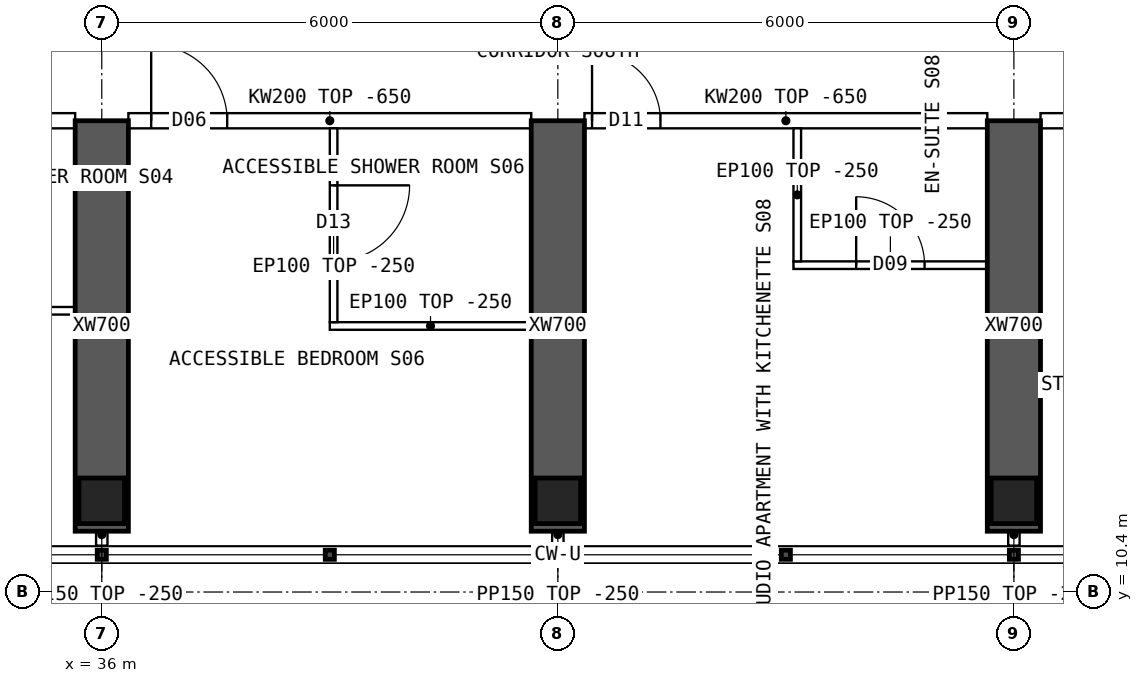
"""IFC4 building model, lengths in metres.
Left out: names, types, materials, properties, quantities, classifications, styles, units other than length and angle.
Written with IfcOpenShell. Run it as: python <this file> out.ifc"""

import sys

from ifc_helpers import new_model, si_unit, direction, frame, frame_2d, origin, origin_2d, place, context, subcontext, project, spatial, polyline, rectangle, hollow_rectangle, outline, extrude, element, fill, save


model = new_model("IFC4")
c1 = context("Model", 3, precision=1e-05, world=origin(), true_north=direction((0.0, 1.0)))
c2 = subcontext(c1, "Body", "Model", "MODEL_VIEW")
j1 = project(units=[si_unit("LENGTHUNIT", "METRE"), si_unit("PLANEANGLEUNIT", "RADIAN")], contexts=[c1])
p1 = place(None, origin())
s1 = spatial("IfcSite", under=j1, at=p1, CompositionType="ELEMENT")
p2 = place(p1, origin())
s2 = spatial("IfcBuilding", under=s1, at=p2, CompositionType="ELEMENT")
p3 = place(p2, frame((0.0, 0.0, 246.55)))
s3 = spatial("IfcBuildingStorey", under=s2, at=p3, CompositionType="ELEMENT", Elevation=246.55)
for number, where, z_axis, x_axis in (
    (1, (36.0, 11.6, 0.0), (0.0, 0.0, 1.0), (1.0, 0.0, 0.0)),
    (2, (42.0, 11.6, 0.0), (0.0, 0.0, 1.0), (1.0, 0.0, 0.0)),
    (3, (48.0, 11.6, 0.0), (0.0, 0.0, 1.0), (1.0, 0.0, 0.0)),
):
    element("IfcColumn", number, at=place(p3, frame(where, z_axis=z_axis, x_axis=x_axis)), inside=s3, PredefinedType="COLUMN", context=c2, shape_type="SweptSolid", body=[
        extrude(hollow_rectangle(XDim=0.6, YDim=0.6, WallThickness=0.06, at=origin_2d()), origin(), (0.0, 0.0, 1.0), 3.75),
    ])
for number, where, z_axis, x_axis in (
    (4, (36.0, 11.2, 0.0), (0.0, 0.0, 1.0), (0.0, 1.0, 0.0)),
    (5, (42.0, 11.2, 0.0), (0.0, 0.0, 1.0), (0.0, 1.0, 0.0)),
    (6, (48.0, 11.2, 0.0), (0.0, 0.0, 1.0), (0.0, 1.0, 0.0)),
):
    element("IfcWall", number, at=place(p3, frame(where, z_axis=z_axis, x_axis=x_axis)), inside=s3, PredefinedType="SHEAR", context=c2, shape_type="SweptSolid", body=[
        extrude(rectangle(XDim=5.4, YDim=0.7, at=frame_2d((2.7, 0.0))), origin(), (0.0, 0.0, 1.0), 3.75),
    ])
p4 = place(p3, frame((30.35, 16.6, 0.0), z_axis=(0.0, 0.0, 1.0), x_axis=(1.0, 0.0, 0.0)))
e7 = element("IfcWall", 7, at=p4, inside=s3, PredefinedType="SOLIDWALL", context=c2, shape_type="SweptSolid", body=[
    extrude(outline(polyline([(0.0, 0.0), (5.3, 0.0), (5.3, 3.1), (0.0, 3.1), (0.0, 0.0)])), frame((0.0, 0.1, 0.0), z_axis=(0.0, -1.0, 0.0), x_axis=(1.0, 0.0, 0.0)), (0.0, 0.0, 1.0), 0.2),
])
p5 = place(p4, frame((2.3, 0.0, 0.0)))
e8 = element("IfcOpeningElement", 8, at=p5, cuts=e7, PredefinedType="OPENING", context=c2, shape_type="SweptSolid", body=[
    extrude(rectangle(XDim=0.9, YDim=2.1, at=frame_2d((0.45, 1.05))), frame((0.0, 0.11, 0.0), z_axis=(0.0, -1.0, 0.0), x_axis=(1.0, 0.0, 0.0)), (0.0, 0.0, 1.0), 0.22),
])
p6 = place(p3, frame((36.35, 16.6, 0.0), z_axis=(0.0, 0.0, 1.0), x_axis=(1.0, 0.0, 0.0)))
e9 = element("IfcWall", 9, at=p6, inside=s3, PredefinedType="SOLIDWALL", context=c2, shape_type="SweptSolid", body=[
    extrude(outline(polyline([(0.0, 0.0), (5.3, 0.0), (5.3, 3.1), (0.0, 3.1), (0.0, 0.0)])), frame((0.0, 0.1, 0.0), z_axis=(0.0, -1.0, 0.0), x_axis=(1.0, 0.0, 0.0)), (0.0, 0.0, 1.0), 0.2),
])
p7 = place(p6, frame((0.3, 0.0, 0.0)))
e10 = element("IfcOpeningElement", 10, at=p7, cuts=e9, PredefinedType="OPENING", context=c2, shape_type="SweptSolid", body=[
    extrude(rectangle(XDim=1.0, YDim=2.1, at=frame_2d((0.5, 1.05))), frame((0.0, 0.11, 0.0), z_axis=(0.0, -1.0, 0.0), x_axis=(1.0, 0.0, 0.0)), (0.0, 0.0, 1.0), 0.22),
])
p8 = place(p3, frame((42.35, 16.6, 0.0), z_axis=(0.0, 0.0, 1.0), x_axis=(1.0, 0.0, 0.0)))
e11 = element("IfcWall", 11, at=p8, inside=s3, PredefinedType="SOLIDWALL", context=c2, shape_type="SweptSolid", body=[
    extrude(outline(polyline([(0.0, 0.0), (5.3, 0.0), (5.3, 3.1), (0.0, 3.1), (0.0, 0.0)])), frame((0.0, 0.1, 0.0), z_axis=(0.0, -1.0, 0.0), x_axis=(1.0, 0.0, 0.0)), (0.0, 0.0, 1.0), 0.2),
])
p9 = place(p8, frame((0.1, 0.0, 0.0)))
e12 = element("IfcOpeningElement", 12, at=p9, cuts=e11, PredefinedType="OPENING", context=c2, shape_type="SweptSolid", body=[
    extrude(rectangle(XDim=0.9, YDim=2.1, at=frame_2d((0.45, 1.05))), frame((0.0, 0.11, 0.0), z_axis=(0.0, -1.0, 0.0), x_axis=(1.0, 0.0, 0.0)), (0.0, 0.0, 1.0), 0.22),
])
p10 = place(p3, frame((48.35, 16.6, 0.0), z_axis=(0.0, 0.0, 1.0), x_axis=(1.0, 0.0, 0.0)))
e13 = element("IfcWall", 13, at=p10, inside=s3, PredefinedType="SOLIDWALL", context=c2, shape_type="SweptSolid", body=[
    extrude(outline(polyline([(0.0, 0.0), (5.3, 0.0), (5.3, 3.1), (0.0, 3.1), (0.0, 0.0)])), frame((0.0, 0.1, 0.0), z_axis=(0.0, -1.0, 0.0), x_axis=(1.0, 0.0, 0.0)), (0.0, 0.0, 1.0), 0.2),
])
p11 = place(p10, frame((2.3, 0.0, 0.0)))
e14 = element("IfcOpeningElement", 14, at=p11, cuts=e13, PredefinedType="OPENING", context=c2, shape_type="SweptSolid", body=[
    extrude(rectangle(XDim=0.9, YDim=2.1, at=frame_2d((0.45, 1.05))), frame((0.0, 0.11, 0.0), z_axis=(0.0, -1.0, 0.0), x_axis=(1.0, 0.0, 0.0)), (0.0, 0.0, 1.0), 0.22),
])
p12 = place(p3, frame((35.65, 14.1, 0.0), z_axis=(0.0, 0.0, 1.0), x_axis=(-1.0, 0.0, 0.0)))
e15 = element("IfcWall", 15, at=p12, inside=s3, PredefinedType="PARTITIONING", context=c2, shape_type="SweptSolid", body=[
    extrude(rectangle(XDim=3.15, YDim=0.1, at=frame_2d((1.575, 0.0))), origin(), (0.0, 0.0, 1.0), 3.5),
])
p13 = place(p12, frame((2.1, 0.0, 0.0)))
e16 = element("IfcOpeningElement", 16, at=p13, cuts=e15, PredefinedType="OPENING", context=c2, shape_type="SweptSolid", body=[
    extrude(rectangle(XDim=0.8, YDim=2.1, at=frame_2d((0.4, 1.05))), frame((0.0, 0.06, 0.0), z_axis=(0.0, -1.0, 0.0), x_axis=(1.0, 0.0, 0.0)), (0.0, 0.0, 1.0), 0.12),
])
p14 = place(p3, frame((39.0, 13.9, 0.0), z_axis=(0.0, 0.0, 1.0), x_axis=(1.0, 0.0, 0.0)))
e17 = element("IfcWall", 17, at=p14, inside=s3, PredefinedType="PARTITIONING", context=c2, shape_type="SweptSolid", body=[
    extrude(rectangle(XDim=2.65, YDim=0.1, at=frame_2d((1.325, 0.0))), origin(), (0.0, 0.0, 1.0), 3.5),
])
p15 = place(p3, frame((39.05, 13.95, 0.0), z_axis=(0.0, 0.0, 1.0), x_axis=(0.0, 1.0, 0.0)))
e18 = element("IfcWall", 18, at=p15, inside=s3, PredefinedType="PARTITIONING", context=c2, shape_type="SweptSolid", body=[
    extrude(outline(polyline([(0.0, 0.0), (2.55, 0.0), (2.55, 3.1), (2.502, 3.1), (2.5, 3.5), (0.0, 3.5), (0.0, 0.0)])), frame((0.0, 0.05, 0.0), z_axis=(0.0, -1.0, 0.0), x_axis=(1.0, 0.0, 0.0)), (0.0, 0.0, 1.0), 0.1),
])
p16 = place(p15, frame((0.8, 0.0, 0.0)))
e19 = element("IfcOpeningElement", 19, at=p16, cuts=e18, PredefinedType="OPENING", context=c2, shape_type="SweptSolid", body=[
    extrude(rectangle(XDim=1.0, YDim=2.1, at=frame_2d((0.5, 1.05))), frame((0.0, 0.06, 0.0), z_axis=(0.0, -1.0, 0.0), x_axis=(1.0, 0.0, 0.0)), (0.0, 0.0, 1.0), 0.12),
])
p17 = place(p3, frame((47.65, 14.7, 0.0), z_axis=(0.0, 0.0, 1.0), x_axis=(-1.0, 0.0, 0.0)))
e20 = element("IfcWall", 20, at=p17, inside=s3, PredefinedType="PARTITIONING", context=c2, shape_type="SweptSolid", body=[
    extrude(rectangle(XDim=2.55, YDim=0.1, at=frame_2d((1.275, 0.0))), origin(), (0.0, 0.0, 1.0), 3.5),
])
p18 = place(p17, frame((0.825, 0.0, 0.0)))
e21 = element("IfcOpeningElement", 21, at=p18, cuts=e20, PredefinedType="OPENING", context=c2, shape_type="SweptSolid", body=[
    extrude(rectangle(XDim=0.9, YDim=2.1, at=frame_2d((0.45, 1.05))), frame((0.0, 0.06, 0.0), z_axis=(0.0, -1.0, 0.0), x_axis=(1.0, 0.0, 0.0)), (0.0, 0.0, 1.0), 0.12),
])
p19 = place(p3, frame((45.15, 14.75, 0.0), z_axis=(0.0, 0.0, 1.0), x_axis=(0.0, 1.0, 0.0)))
e22 = element("IfcWall", 22, at=p19, inside=s3, PredefinedType="PARTITIONING", context=c2, shape_type="SweptSolid", body=[
    extrude(outline(polyline([(0.0, 0.0), (1.75, 0.0), (1.75, 3.1), (1.702, 3.1), (1.7, 3.5), (0.0, 3.5), (0.0, 0.0)])), frame((0.0, 0.05, 0.0), z_axis=(0.0, -1.0, 0.0), x_axis=(1.0, 0.0, 0.0)), (0.0, 0.0, 1.0), 0.1),
])
for number, where, z_axis, x_axis in (
    (23, (36.0, 11.3, 0.0), (0.0, 0.0, 1.0), (0.0, -1.0, 0.0)),
    (24, (42.0, 11.3, 0.0), (0.0, 0.0, 1.0), (0.0, -1.0, 0.0)),
    (25, (48.0, 11.3, 0.0), (0.0, 0.0, 1.0), (0.0, -1.0, 0.0)),
):
    element("IfcWall", number, at=place(p3, frame(where, z_axis=z_axis, x_axis=x_axis)), inside=s3, PredefinedType="PARTITIONING", context=c2, shape_type="SweptSolid", body=[
        extrude(rectangle(XDim=0.29, YDim=0.15, at=frame_2d((0.145, 0.0))), origin(), (0.0, 0.0, 1.0), 3.5),
    ])
p20 = place(p16, origin())
e26 = element("IfcDoor", 26, at=p20, inside=s3, OperationType="SINGLE_SWING_RIGHT", PredefinedType="DOOR", context=c2, shape_type="SweptSolid", body=[
    extrude(rectangle(XDim=1.0, YDim=2.1, at=frame_2d((0.5, 1.05))), frame((0.0, 0.025, 0.0), z_axis=(0.0, -1.0, 0.0), x_axis=(1.0, 0.0, 0.0)), (0.0, 0.0, 1.0), 0.05),
])
fill(e19, e26)
p21 = place(p7, origin())
e27 = element("IfcDoor", 27, at=p21, inside=s3, OperationType="SINGLE_SWING_LEFT", PredefinedType="DOOR", context=c2, shape_type="SweptSolid", body=[
    extrude(rectangle(XDim=1.0, YDim=2.1, at=frame_2d((0.5, 1.05))), frame((0.0, 0.025, 0.0), z_axis=(0.0, -1.0, 0.0), x_axis=(1.0, 0.0, 0.0)), (0.0, 0.0, 1.0), 0.05),
])
fill(e10, e27)
p22 = place(p18, origin())
e28 = element("IfcDoor", 28, at=p22, inside=s3, OperationType="SINGLE_SWING_RIGHT", PredefinedType="DOOR", context=c2, shape_type="SweptSolid", body=[
    extrude(rectangle(XDim=0.9, YDim=2.1, at=frame_2d((0.45, 1.05))), frame((0.0, 0.025, 0.0), z_axis=(0.0, -1.0, 0.0), x_axis=(1.0, 0.0, 0.0)), (0.0, 0.0, 1.0), 0.05),
])
fill(e21, e28)
p23 = place(p9, origin())
e29 = element("IfcDoor", 29, at=p23, inside=s3, OperationType="SINGLE_SWING_LEFT", PredefinedType="DOOR", context=c2, shape_type="SweptSolid", body=[
    extrude(rectangle(XDim=0.9, YDim=2.1, at=frame_2d((0.45, 1.05))), frame((0.0, 0.025, 0.0), z_axis=(0.0, -1.0, 0.0), x_axis=(1.0, 0.0, 0.0)), (0.0, 0.0, 1.0), 0.05),
])
fill(e12, e29)
save(model, sys.argv[1])
